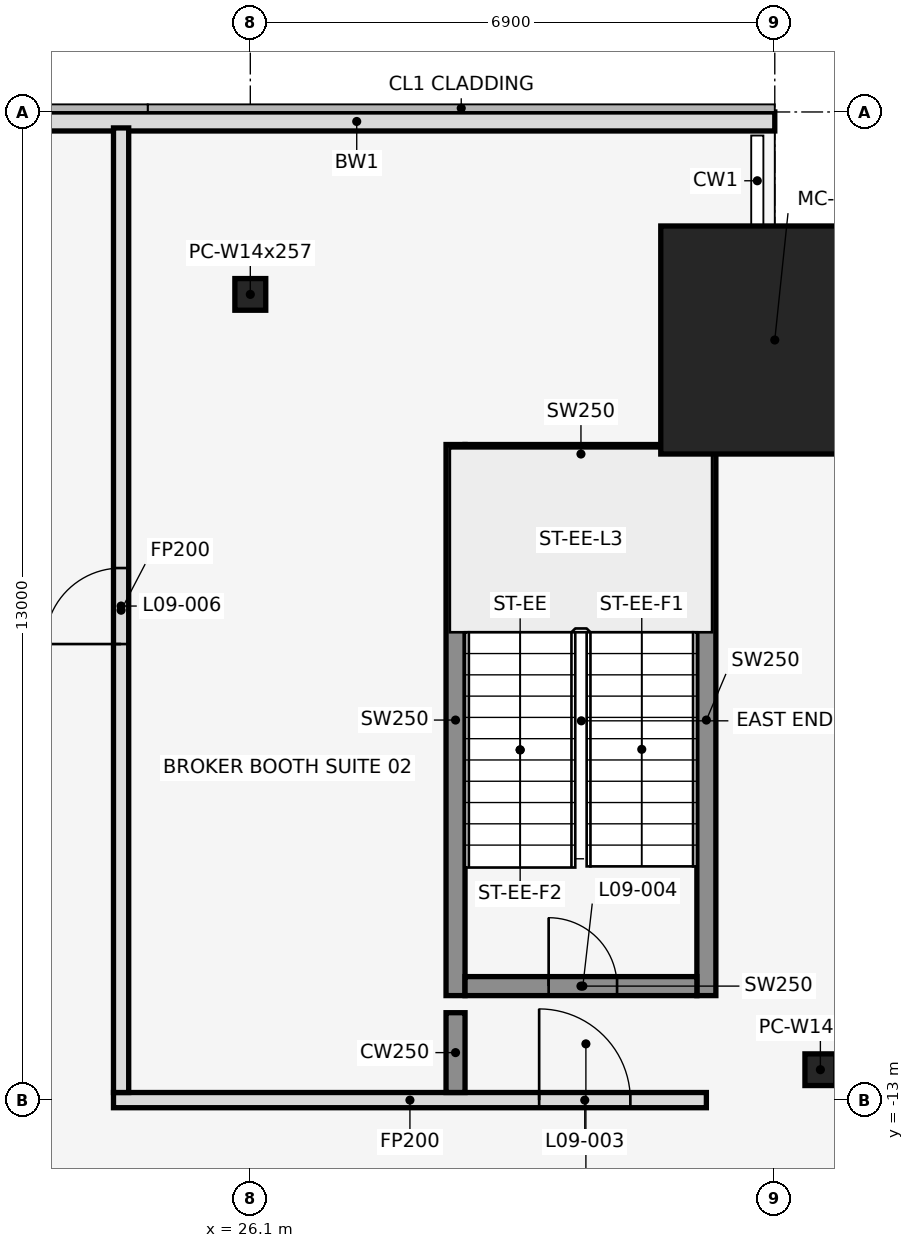
"""IFC4 building model, lengths in metres.
Left out: names, types, materials, properties, quantities, classifications, styles, units other than length and angle.
Written with IfcOpenShell. Run it as: python <this file> out.ifc"""

import sys

from ifc_helpers import new_model, si_unit, direction, frame, frame_2d, origin, origin_2d, place, context, subcontext, project, spatial, rectangle, hollow_rectangle, i_section, extrude, element, fill, save


model = new_model("IFC4")
c1 = context("Model", 3, precision=1e-05, world=origin(), true_north=direction((0.0, 1.0)))
c2 = subcontext(c1, "Body", "Model", "MODEL_VIEW")
j1 = project(units=[si_unit("LENGTHUNIT", "METRE"), si_unit("PLANEANGLEUNIT", "RADIAN")], contexts=[c1])
p1 = place(None, origin())
s1 = spatial("IfcSite", under=j1, at=p1, CompositionType="ELEMENT")
p2 = place(p1, origin())
s2 = spatial("IfcBuilding", under=s1, at=p2, CompositionType="ELEMENT")
p3 = place(p2, frame((0.0, 0.0, 48.5)))
s3 = spatial("IfcBuildingStorey", under=s2, at=p3, CompositionType="ELEMENT", Elevation=48.5)
p4 = place(p3, frame((26.1, -2.4, 0.0), z_axis=(0.0, 0.0, 1.0), x_axis=(1.0, 0.0, 0.0)))
e1 = element("IfcColumn", 1, at=p4, inside=s3, PredefinedType="COLUMN", context=c2, shape_type="SweptSolid", body=[
    extrude(i_section(OverallWidth=0.406, OverallDepth=0.417, WebThickness=0.03, FlangeThickness=0.048, at=origin_2d()), origin(), (0.0, 0.0, 1.0), 4.5),
])
p5 = place(p3, frame((33.0, -3.0, 0.0), z_axis=(0.0, 0.0, 1.0), x_axis=(1.0, 0.0, 0.0)))
e2 = element("IfcColumn", 2, at=p5, inside=s3, PredefinedType="COLUMN", context=c2, shape_type="SweptSolid", body=[
    extrude(hollow_rectangle(XDim=3.0, YDim=3.0, WallThickness=0.1, at=origin_2d()), origin(), (0.0, 0.0, 1.0), 4.5),
])
p6 = place(p3, frame((33.6, -12.6, 0.0), z_axis=(0.0, 0.0, 1.0), x_axis=(1.0, 0.0, 0.0)))
e3 = element("IfcColumn", 3, at=p6, inside=s3, PredefinedType="COLUMN", context=c2, shape_type="SweptSolid", body=[
    extrude(i_section(OverallWidth=0.406, OverallDepth=0.417, WebThickness=0.03, FlangeThickness=0.048, at=origin_2d()), origin(), (0.0, 0.0, 1.0), 4.5),
])
p7 = place(p3, frame((33.0, -0.125, 0.0), z_axis=(0.0, 0.0, 1.0), x_axis=(-1.0, 0.0, 0.0)))
e4 = element("IfcWall", 4, at=p7, inside=s3, PredefinedType="STANDARD", context=c2, shape_type="SweptSolid", body=[
    extrude(rectangle(XDim=11.0, YDim=0.25, at=frame_2d((5.5, 0.0))), origin(), (0.0, 0.0, 1.0), 4.35),
])
for number, where, z_axis, x_axis in (
    (5, (28.8, -11.625, 0.0), (0.0, 0.0, 1.0), (0.0, 1.0, 0.0)),
    (6, (32.1, -11.625, 0.0), (0.0, 0.0, 1.0), (0.0, 1.0, 0.0)),
):
    element("IfcWall", number, at=place(p3, frame(where, z_axis=z_axis, x_axis=x_axis)), inside=s3, PredefinedType="SHEAR", context=c2, shape_type="SweptSolid", body=[
        extrude(rectangle(XDim=7.25, YDim=0.25, at=frame_2d((3.625, 0.0))), origin(), (0.0, 0.0, 1.0), 4.5),
    ])
p8 = place(p3, frame((28.925, -11.5, 0.0), z_axis=(0.0, 0.0, 1.0), x_axis=(1.0, 0.0, 0.0)))
e7 = element("IfcWall", 7, at=p8, inside=s3, PredefinedType="SHEAR", context=c2, shape_type="SweptSolid", body=[
    extrude(rectangle(XDim=3.05, YDim=0.25, at=frame_2d((1.525, 0.0))), origin(), (0.0, 0.0, 1.0), 4.5),
])
p9 = place(p8, frame((1.1, 0.0, 0.0)))
e8 = element("IfcOpeningElement", 8, at=p9, cuts=e7, PredefinedType="OPENING", context=c2, shape_type="SweptSolid", body=[
    extrude(rectangle(XDim=0.9, YDim=2.1, at=frame_2d((0.45, 1.05))), frame((0.0, 0.137, 0.0), z_axis=(0.0, -1.0, 0.0), x_axis=(1.0, 0.0, 0.0)), (0.0, 0.0, 1.0), 0.274),
])
p10 = place(p3, frame((28.925, -4.5, 0.0), z_axis=(0.0, 0.0, 1.0), x_axis=(1.0, 0.0, 0.0)))
e9 = element("IfcWall", 9, at=p10, inside=s3, PredefinedType="SHEAR", context=c2, shape_type="SweptSolid", body=[
    extrude(rectangle(XDim=3.05, YDim=0.25, at=frame_2d((1.525, 0.0))), origin(), (0.0, 0.0, 1.0), 4.5),
])
p11 = place(p3, frame((24.3, -13.0, 0.0), z_axis=(0.0, 0.0, 1.0), x_axis=(1.0, 0.0, 0.0)))
e10 = element("IfcWall", 10, at=p11, inside=s3, PredefinedType="PARTITIONING", context=c2, shape_type="SweptSolid", body=[
    extrude(rectangle(XDim=7.8, YDim=0.2, at=frame_2d((3.9, 0.0))), origin(), (0.0, 0.0, 1.0), 3.418),
])
p12 = place(p11, frame((5.6, 0.0, 0.0)))
e11 = element("IfcOpeningElement", 11, at=p12, cuts=e10, PredefinedType="OPENING", context=c2, shape_type="SweptSolid", body=[
    extrude(rectangle(XDim=1.2, YDim=2.1, at=frame_2d((0.6, 1.05))), frame((0.0, 0.112, 0.0), z_axis=(0.0, -1.0, 0.0), x_axis=(1.0, 0.0, 0.0)), (0.0, 0.0, 1.0), 0.224),
])
p13 = place(p3, frame((24.4, -12.9, 0.0), z_axis=(0.0, 0.0, 1.0), x_axis=(0.0, 1.0, 0.0)))
e12 = element("IfcWall", 12, at=p13, inside=s3, PredefinedType="PARTITIONING", context=c2, shape_type="SweptSolid", body=[
    extrude(rectangle(XDim=12.69, YDim=0.2, at=frame_2d((6.345, 0.0))), origin(), (0.0, 0.0, 1.0), 3.418),
])
p14 = place(p13, frame((5.9, 0.0, 0.0)))
e13 = element("IfcOpeningElement", 13, at=p14, cuts=e12, PredefinedType="OPENING", context=c2, shape_type="SweptSolid", body=[
    extrude(rectangle(XDim=1.0, YDim=2.1, at=frame_2d((0.5, 1.05))), frame((0.0, 0.112, 0.0), z_axis=(0.0, -1.0, 0.0), x_axis=(1.0, 0.0, 0.0)), (0.0, 0.0, 1.0), 0.224),
])
p15 = place(p3, frame((28.8, -12.9, 0.0), z_axis=(0.0, 0.0, 1.0), x_axis=(0.0, 1.0, 0.0)))
e14 = element("IfcWall", 14, at=p15, inside=s3, PredefinedType="SHEAR", context=c2, shape_type="SweptSolid", body=[
    extrude(rectangle(XDim=1.05, YDim=0.25, at=frame_2d((0.525, 0.0))), origin(), (0.0, 0.0, 1.0), 4.5),
])
p16 = place(p12, origin())
e15 = element("IfcDoor", 15, at=p16, inside=s3, OperationType="SINGLE_SWING_RIGHT", PredefinedType="DOOR", context=c2, shape_type="SweptSolid", body=[
    extrude(rectangle(XDim=1.2, YDim=2.1, at=frame_2d((0.6, 1.05))), frame((0.0, 0.025, 0.0), z_axis=(0.0, -1.0, 0.0), x_axis=(1.0, 0.0, 0.0)), (0.0, 0.0, 1.0), 0.05),
])
fill(e11, e15)
p17 = place(p9, origin())
e16 = element("IfcDoor", 16, at=p17, inside=s3, OperationType="SINGLE_SWING_LEFT", PredefinedType="DOOR", context=c2, shape_type="SweptSolid", body=[
    extrude(rectangle(XDim=0.9, YDim=2.1, at=frame_2d((0.45, 1.05))), frame((0.0, 0.025, 0.0), z_axis=(0.0, -1.0, 0.0), x_axis=(1.0, 0.0, 0.0)), (0.0, 0.0, 1.0), 0.05),
])
fill(e8, e16)
p18 = place(p14, frame((1.0, 0.0, 0.0), z_axis=(0.0, 0.0, 1.0), x_axis=(-1.0, 0.0, 0.0)))
e17 = element("IfcDoor", 17, at=p18, inside=s3, OperationType="SINGLE_SWING_RIGHT", PredefinedType="DOOR", context=c2, shape_type="SweptSolid", body=[
    extrude(rectangle(XDim=1.0, YDim=2.1, at=frame_2d((0.5, 1.05))), frame((0.0, 0.025, 0.0), z_axis=(0.0, -1.0, 0.0), x_axis=(1.0, 0.0, 0.0)), (0.0, 0.0, 1.0), 0.05),
])
fill(e13, e17)
save(model, sys.argv[1])
